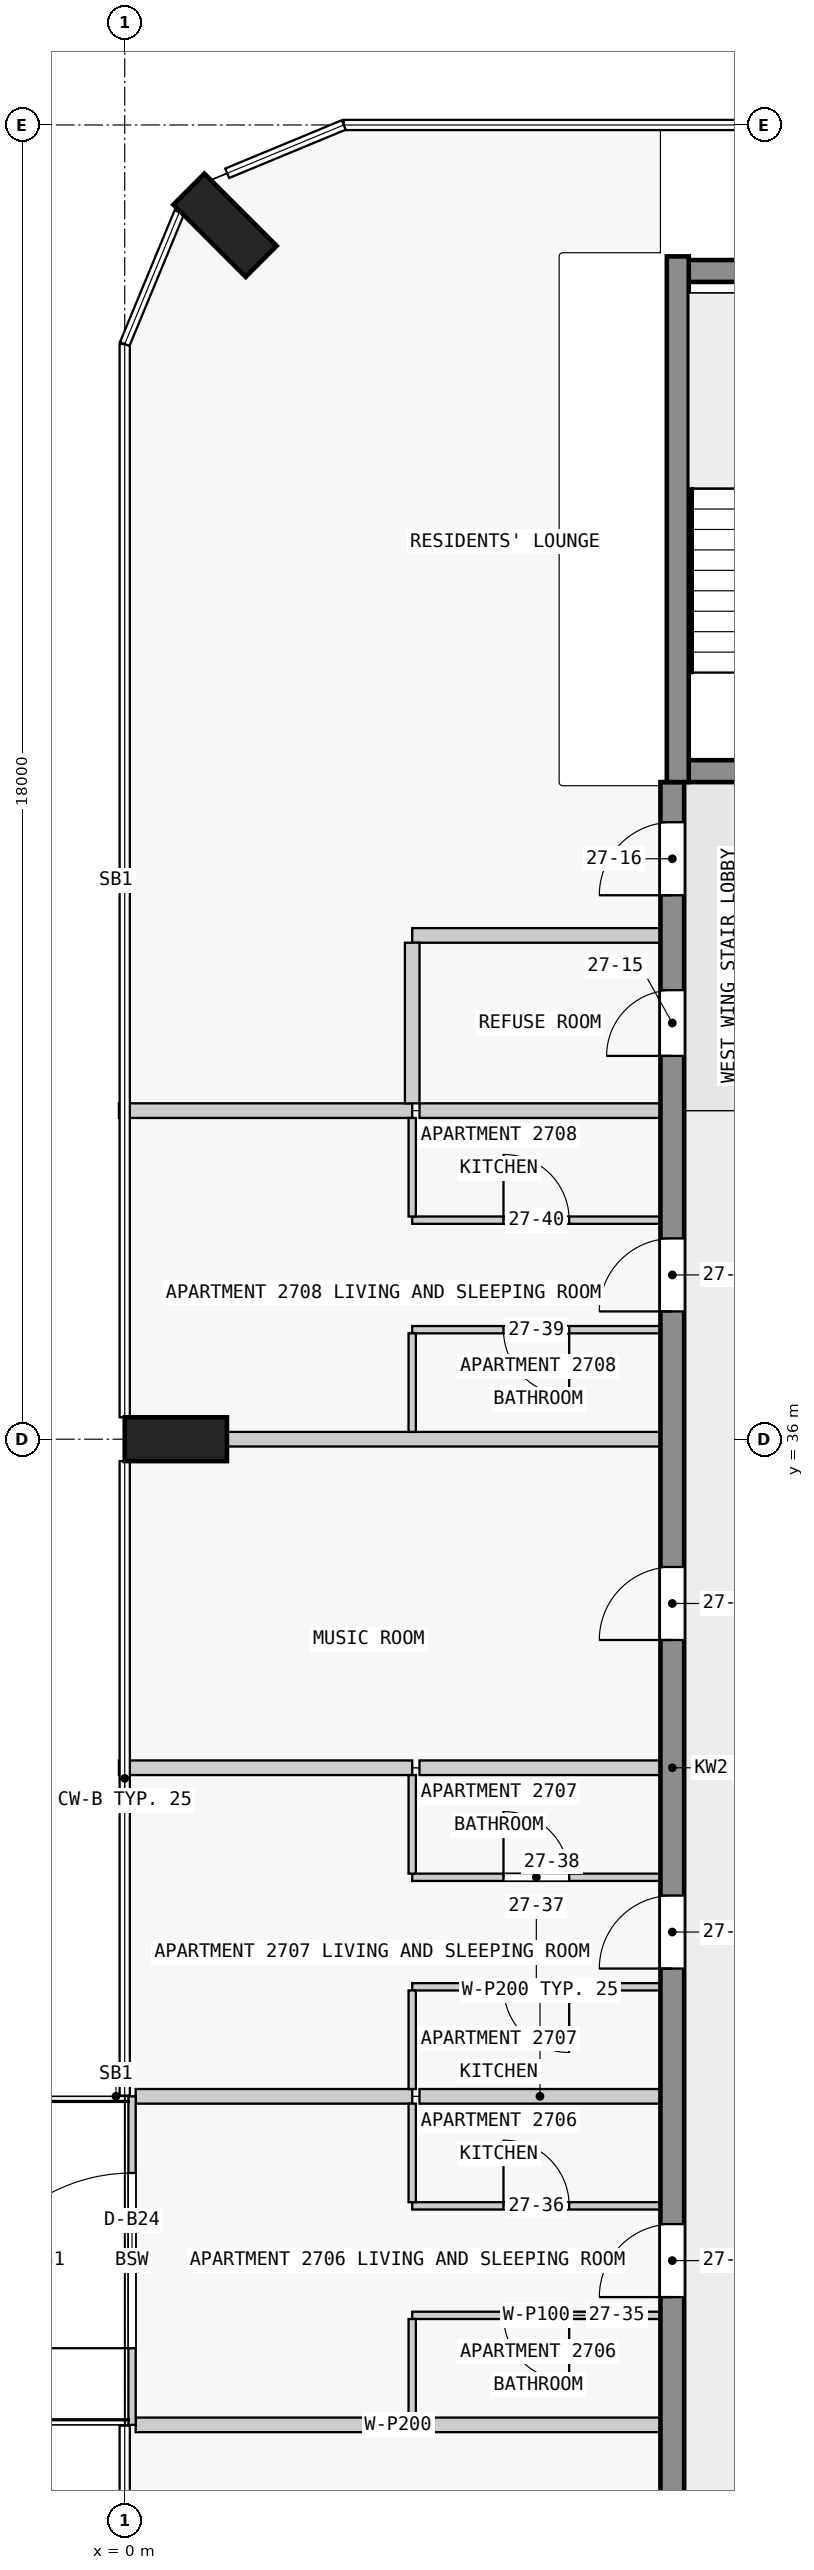
"""IFC4 building model, lengths in metres.
Left out: names, types, materials, properties, quantities, classifications, styles, units other than length and angle.
Written with IfcOpenShell. Run it as: python <this file> out.ifc"""

import sys

from ifc_helpers import new_model, si_unit, direction, frame, frame_2d, origin, origin_2d, place, context, subcontext, project, spatial, rectangle, extrude, element, fill, save


model = new_model("IFC4")
c1 = context("Model", 3, precision=1e-05, world=origin(), true_north=direction((0.0, 1.0)))
c2 = subcontext(c1, "Body", "Model", "MODEL_VIEW")
j1 = project(units=[si_unit("LENGTHUNIT", "METRE"), si_unit("PLANEANGLEUNIT", "RADIAN")], contexts=[c1])
p1 = place(None, origin())
s1 = spatial("IfcSite", under=j1, at=p1, CompositionType="ELEMENT")
p2 = place(p1, origin())
s2 = spatial("IfcBuilding", under=s1, at=p2, CompositionType="ELEMENT")
p3 = place(p2, frame((0.0, 0.0, 106.3)))
s3 = spatial("IfcBuildingStorey", under=s2, at=p3, CompositionType="ELEMENT", Elevation=106.3)
for number, where, z_axis, x_axis in (
    (1, (1.374, 52.626, 0.0), (0.0, 0.0, 1.0), (0.707, 0.707, 0.0)),
    (2, (0.7, 36.0, 0.0), (0.0, 0.0, 1.0), (0.0, 1.0, 0.0)),
):
    element("IfcColumn", number, at=place(p3, frame(where, z_axis=z_axis, x_axis=x_axis)), inside=s3, PredefinedType="COLUMN", context=c2, shape_type="SweptSolid", body=[
        extrude(rectangle(XDim=0.6, YDim=1.4, at=origin_2d()), origin(), (0.0, 0.0, 1.0), 3.5),
    ])
p4 = place(p3, frame((7.725, 45.15, 0.0), z_axis=(0.0, 0.0, 1.0), x_axis=(1.0, 0.0, 0.0)))
e3 = element("IfcWall", 3, at=p4, inside=s3, PredefinedType="SHEAR", context=c2, shape_type="SweptSolid", body=[
    extrude(rectangle(XDim=2.55, YDim=0.3, at=frame_2d((1.275, 0.0))), origin(), (0.0, 0.0, 1.0), 3.5),
])
p5 = place(p4, frame((0.725, 0.0, 0.0)))
e4 = element("IfcOpeningElement", 4, at=p5, cuts=e3, PredefinedType="OPENING", context=c2, shape_type="SweptSolid", body=[
    extrude(rectangle(XDim=1.1, YDim=2.1, at=frame_2d((0.55, 1.05))), frame((0.0, 0.16, 0.0), z_axis=(0.0, -1.0, 0.0), x_axis=(1.0, 0.0, 0.0)), (0.0, 0.0, 1.0), 0.32),
])
p6 = place(p3, frame((7.725, 52.0, 0.0), z_axis=(0.0, 0.0, 1.0), x_axis=(1.0, 0.0, 0.0)))
e5 = element("IfcWall", 5, at=p6, inside=s3, PredefinedType="SHEAR", context=c2, shape_type="SweptSolid", body=[
    extrude(rectangle(XDim=2.55, YDim=0.3, at=frame_2d((1.275, 0.0))), origin(), (0.0, 0.0, 1.0), 3.5),
])
p7 = place(p3, frame((7.575, 45.0, 0.0), z_axis=(0.0, 0.0, 1.0), x_axis=(0.0, 1.0, 0.0)))
e6 = element("IfcWall", 6, at=p7, inside=s3, PredefinedType="SHEAR", context=c2, shape_type="SweptSolid", body=[
    extrude(rectangle(XDim=7.2, YDim=0.3, at=frame_2d((3.6, 0.0))), origin(), (0.0, 0.0, 1.0), 3.5),
])
p8 = place(p3, frame((7.5, 18.0, 0.0), z_axis=(0.0, 0.0, 1.0), x_axis=(0.0, 1.0, 0.0)))
e7 = element("IfcWall", 7, at=p8, inside=s3, PredefinedType="SHEAR", context=c2, shape_type="SweptSolid", body=[
    extrude(rectangle(XDim=27.0, YDim=0.325, at=frame_2d((13.5, 0.0))), origin(), (0.0, 0.0, 1.0), 3.25),
])
p9 = place(p8, frame((1.75, 0.0, 0.0)))
e8 = element("IfcOpeningElement", 8, at=p9, cuts=e7, PredefinedType="OPENING", context=c2, shape_type="SweptSolid", body=[
    extrude(rectangle(XDim=1.0, YDim=2.1, at=frame_2d((0.5, 1.05))), frame((0.0, 0.172, 0.0), z_axis=(0.0, -1.0, 0.0), x_axis=(1.0, 0.0, 0.0)), (0.0, 0.0, 1.0), 0.345),
])
p10 = place(p8, frame((6.25, 0.0, 0.0)))
e9 = element("IfcOpeningElement", 9, at=p10, cuts=e7, PredefinedType="OPENING", context=c2, shape_type="SweptSolid", body=[
    extrude(rectangle(XDim=1.0, YDim=2.1, at=frame_2d((0.5, 1.05))), frame((0.0, 0.172, 0.0), z_axis=(0.0, -1.0, 0.0), x_axis=(1.0, 0.0, 0.0)), (0.0, 0.0, 1.0), 0.345),
])
p11 = place(p8, frame((10.75, 0.0, 0.0)))
e10 = element("IfcOpeningElement", 10, at=p11, cuts=e7, PredefinedType="OPENING", context=c2, shape_type="SweptSolid", body=[
    extrude(rectangle(XDim=1.0, YDim=2.1, at=frame_2d((0.5, 1.05))), frame((0.0, 0.172, 0.0), z_axis=(0.0, -1.0, 0.0), x_axis=(1.0, 0.0, 0.0)), (0.0, 0.0, 1.0), 0.345),
])
p12 = place(p8, frame((15.25, 0.0, 0.0)))
e11 = element("IfcOpeningElement", 11, at=p12, cuts=e7, PredefinedType="OPENING", context=c2, shape_type="SweptSolid", body=[
    extrude(rectangle(XDim=1.0, YDim=2.1, at=frame_2d((0.5, 1.05))), frame((0.0, 0.172, 0.0), z_axis=(0.0, -1.0, 0.0), x_axis=(1.0, 0.0, 0.0)), (0.0, 0.0, 1.0), 0.345),
])
p13 = place(p8, frame((19.75, 0.0, 0.0)))
e12 = element("IfcOpeningElement", 12, at=p13, cuts=e7, PredefinedType="OPENING", context=c2, shape_type="SweptSolid", body=[
    extrude(rectangle(XDim=1.0, YDim=2.1, at=frame_2d((0.5, 1.05))), frame((0.0, 0.172, 0.0), z_axis=(0.0, -1.0, 0.0), x_axis=(1.0, 0.0, 0.0)), (0.0, 0.0, 1.0), 0.345),
])
p14 = place(p8, frame((23.25, 0.0, 0.0)))
e13 = element("IfcOpeningElement", 13, at=p14, cuts=e7, PredefinedType="OPENING", context=c2, shape_type="SweptSolid", body=[
    extrude(rectangle(XDim=0.9, YDim=2.1, at=frame_2d((0.45, 1.05))), frame((0.0, 0.172, 0.0), z_axis=(0.0, -1.0, 0.0), x_axis=(1.0, 0.0, 0.0)), (0.0, 0.0, 1.0), 0.345),
])
p15 = place(p8, frame((25.45, 0.0, 0.0)))
e14 = element("IfcOpeningElement", 14, at=p15, cuts=e7, PredefinedType="OPENING", context=c2, shape_type="SweptSolid", body=[
    extrude(rectangle(XDim=1.0, YDim=2.1, at=frame_2d((0.5, 1.05))), frame((0.0, 0.172, 0.0), z_axis=(0.0, -1.0, 0.0), x_axis=(1.0, 0.0, 0.0)), (0.0, 0.0, 1.0), 0.345),
])
p16 = place(p3, frame((0.1, 22.5, 0.0), z_axis=(0.0, 0.0, 1.0), x_axis=(0.0, 1.0, 0.0)))
e15 = element("IfcWall", 15, at=p16, inside=s3, PredefinedType="STANDARD", context=c2, shape_type="SweptSolid", body=[
    extrude(rectangle(XDim=4.5, YDim=0.1, at=frame_2d((2.25, 0.0))), origin(), (0.0, 0.0, 1.0), 3.25),
])
p17 = place(p16, frame((1.05, 0.0, 0.0)))
e16 = element("IfcOpeningElement", 16, at=p17, cuts=e15, PredefinedType="OPENING", context=c2, shape_type="SweptSolid", body=[
    extrude(rectangle(XDim=2.4, YDim=2.4, at=frame_2d((1.2, 1.2))), frame((0.0, 0.06, 0.0), z_axis=(0.0, -1.0, 0.0), x_axis=(1.0, 0.0, 0.0)), (0.0, 0.0, 1.0), 0.12),
])
p18 = place(p3, frame((7.337, 22.5, 0.0), z_axis=(0.0, 0.0, 1.0), x_axis=(-1.0, 0.0, 0.0)))
e17 = element("IfcWall", 17, at=p18, inside=s3, PredefinedType="PARTITIONING", context=c2, shape_type="SweptSolid", body=[
    extrude(rectangle(XDim=7.188, YDim=0.2, at=frame_2d((3.594, 0.0))), origin(), (0.0, 0.0, 1.0), 3.25),
])
p19 = place(p3, frame((7.337, 24.0, 0.0), z_axis=(0.0, 0.0, 1.0), x_axis=(-1.0, 0.0, 0.0)))
e18 = element("IfcWall", 18, at=p19, inside=s3, PredefinedType="PARTITIONING", context=c2, shape_type="SweptSolid", body=[
    extrude(rectangle(XDim=3.4, YDim=0.1, at=frame_2d((1.7, 0.0))), origin(), (0.0, 0.0, 1.0), 3.25),
])
p20 = place(p19, frame((1.25, 0.0, 0.0)))
e19 = element("IfcOpeningElement", 19, at=p20, cuts=e18, PredefinedType="OPENING", context=c2, shape_type="SweptSolid", body=[
    extrude(rectangle(XDim=0.9, YDim=2.1, at=frame_2d((0.45, 1.05))), frame((0.0, 0.06, 0.0), z_axis=(0.0, -1.0, 0.0), x_axis=(1.0, 0.0, 0.0)), (0.0, 0.0, 1.0), 0.12),
])
p21 = place(p3, frame((3.938, 25.5, 0.0), z_axis=(0.0, 0.0, 1.0), x_axis=(1.0, 0.0, 0.0)))
e20 = element("IfcWall", 20, at=p21, inside=s3, PredefinedType="PARTITIONING", context=c2, shape_type="SweptSolid", body=[
    extrude(rectangle(XDim=3.4, YDim=0.1, at=frame_2d((1.7, 0.0))), origin(), (0.0, 0.0, 1.0), 3.25),
])
p22 = place(p21, frame((1.25, 0.0, 0.0)))
e21 = element("IfcOpeningElement", 21, at=p22, cuts=e20, PredefinedType="OPENING", context=c2, shape_type="SweptSolid", body=[
    extrude(rectangle(XDim=0.9, YDim=2.1, at=frame_2d((0.45, 1.05))), frame((0.0, 0.06, 0.0), z_axis=(0.0, -1.0, 0.0), x_axis=(1.0, 0.0, 0.0)), (0.0, 0.0, 1.0), 0.12),
])
p23 = place(p3, frame((7.337, 27.0, 0.0), z_axis=(0.0, 0.0, 1.0), x_axis=(-1.0, 0.0, 0.0)))
e22 = element("IfcWall", 22, at=p23, inside=s3, PredefinedType="PARTITIONING", context=c2, shape_type="SweptSolid", body=[
    extrude(rectangle(XDim=3.3, YDim=0.2, at=frame_2d((1.65, 0.0))), origin(), (0.0, 0.0, 1.0), 3.25),
])
p24 = place(p3, frame((0.15, 27.0, 0.0), z_axis=(0.0, 0.0, 1.0), x_axis=(1.0, 0.0, 0.0)))
e23 = element("IfcWall", 23, at=p24, inside=s3, PredefinedType="PARTITIONING", context=c2, shape_type="SweptSolid", body=[
    extrude(rectangle(XDim=3.788, YDim=0.2, at=frame_2d((1.894, 0.0))), origin(), (0.0, 0.0, 1.0), 3.25),
])
p25 = place(p3, frame((7.337, 28.5, 0.0), z_axis=(0.0, 0.0, 1.0), x_axis=(-1.0, 0.0, 0.0)))
e24 = element("IfcWall", 24, at=p25, inside=s3, PredefinedType="PARTITIONING", context=c2, shape_type="SweptSolid", body=[
    extrude(rectangle(XDim=3.4, YDim=0.1, at=frame_2d((1.7, 0.0))), origin(), (0.0, 0.0, 1.0), 3.25),
])
p26 = place(p25, frame((1.25, 0.0, 0.0)))
e25 = element("IfcOpeningElement", 25, at=p26, cuts=e24, PredefinedType="OPENING", context=c2, shape_type="SweptSolid", body=[
    extrude(rectangle(XDim=0.9, YDim=2.1, at=frame_2d((0.45, 1.05))), frame((0.0, 0.06, 0.0), z_axis=(0.0, -1.0, 0.0), x_axis=(1.0, 0.0, 0.0)), (0.0, 0.0, 1.0), 0.12),
])
p27 = place(p3, frame((3.938, 30.0, 0.0), z_axis=(0.0, 0.0, 1.0), x_axis=(1.0, 0.0, 0.0)))
e26 = element("IfcWall", 26, at=p27, inside=s3, PredefinedType="PARTITIONING", context=c2, shape_type="SweptSolid", body=[
    extrude(rectangle(XDim=3.4, YDim=0.1, at=frame_2d((1.7, 0.0))), origin(), (0.0, 0.0, 1.0), 3.25),
])
p28 = place(p27, frame((1.25, 0.0, 0.0)))
e27 = element("IfcOpeningElement", 27, at=p28, cuts=e26, PredefinedType="OPENING", context=c2, shape_type="SweptSolid", body=[
    extrude(rectangle(XDim=0.9, YDim=2.1, at=frame_2d((0.45, 1.05))), frame((0.0, 0.06, 0.0), z_axis=(0.0, -1.0, 0.0), x_axis=(1.0, 0.0, 0.0)), (0.0, 0.0, 1.0), 0.12),
])
p29 = place(p3, frame((7.337, 31.5, 0.0), z_axis=(0.0, 0.0, 1.0), x_axis=(-1.0, 0.0, 0.0)))
e28 = element("IfcWall", 28, at=p29, inside=s3, PredefinedType="PARTITIONING", context=c2, shape_type="SweptSolid", body=[
    extrude(rectangle(XDim=3.3, YDim=0.2, at=frame_2d((1.65, 0.0))), origin(), (0.0, 0.0, 1.0), 3.25),
])
p30 = place(p3, frame((-0.08, 31.5, 0.0), z_axis=(0.0, 0.0, 1.0), x_axis=(1.0, 0.0, 0.0)))
e29 = element("IfcWall", 29, at=p30, inside=s3, PredefinedType="PARTITIONING", context=c2, shape_type="SweptSolid", body=[
    extrude(rectangle(XDim=4.018, YDim=0.2, at=frame_2d((2.009, 0.0))), origin(), (0.0, 0.0, 1.0), 3.25),
])
p31 = place(p3, frame((7.337, 36.0, 0.0), z_axis=(0.0, 0.0, 1.0), x_axis=(-1.0, 0.0, 0.0)))
e30 = element("IfcWall", 30, at=p31, inside=s3, PredefinedType="PARTITIONING", context=c2, shape_type="SweptSolid", body=[
    extrude(rectangle(XDim=5.938, YDim=0.2, at=frame_2d((2.969, 0.0))), origin(), (0.0, 0.0, 1.0), 3.25),
])
p32 = place(p3, frame((7.337, 37.5, 0.0), z_axis=(0.0, 0.0, 1.0), x_axis=(-1.0, 0.0, 0.0)))
e31 = element("IfcWall", 31, at=p32, inside=s3, PredefinedType="PARTITIONING", context=c2, shape_type="SweptSolid", body=[
    extrude(rectangle(XDim=3.4, YDim=0.1, at=frame_2d((1.7, 0.0))), origin(), (0.0, 0.0, 1.0), 3.25),
])
p33 = place(p32, frame((1.25, 0.0, 0.0)))
e32 = element("IfcOpeningElement", 32, at=p33, cuts=e31, PredefinedType="OPENING", context=c2, shape_type="SweptSolid", body=[
    extrude(rectangle(XDim=0.9, YDim=2.1, at=frame_2d((0.45, 1.05))), frame((0.0, 0.06, 0.0), z_axis=(0.0, -1.0, 0.0), x_axis=(1.0, 0.0, 0.0)), (0.0, 0.0, 1.0), 0.12),
])
p34 = place(p3, frame((3.938, 39.0, 0.0), z_axis=(0.0, 0.0, 1.0), x_axis=(1.0, 0.0, 0.0)))
e33 = element("IfcWall", 33, at=p34, inside=s3, PredefinedType="PARTITIONING", context=c2, shape_type="SweptSolid", body=[
    extrude(rectangle(XDim=3.4, YDim=0.1, at=frame_2d((1.7, 0.0))), origin(), (0.0, 0.0, 1.0), 3.25),
])
p35 = place(p34, frame((1.25, 0.0, 0.0)))
e34 = element("IfcOpeningElement", 34, at=p35, cuts=e33, PredefinedType="OPENING", context=c2, shape_type="SweptSolid", body=[
    extrude(rectangle(XDim=0.9, YDim=2.1, at=frame_2d((0.45, 1.05))), frame((0.0, 0.06, 0.0), z_axis=(0.0, -1.0, 0.0), x_axis=(1.0, 0.0, 0.0)), (0.0, 0.0, 1.0), 0.12),
])
p36 = place(p3, frame((7.337, 40.5, 0.0), z_axis=(0.0, 0.0, 1.0), x_axis=(-1.0, 0.0, 0.0)))
e35 = element("IfcWall", 35, at=p36, inside=s3, PredefinedType="PARTITIONING", context=c2, shape_type="SweptSolid", body=[
    extrude(rectangle(XDim=3.3, YDim=0.2, at=frame_2d((1.65, 0.0))), origin(), (0.0, 0.0, 1.0), 3.25),
])
p37 = place(p3, frame((-0.08, 40.5, 0.0), z_axis=(0.0, 0.0, 1.0), x_axis=(1.0, 0.0, 0.0)))
e36 = element("IfcWall", 36, at=p37, inside=s3, PredefinedType="PARTITIONING", context=c2, shape_type="SweptSolid", body=[
    extrude(rectangle(XDim=4.018, YDim=0.2, at=frame_2d((2.009, 0.0))), origin(), (0.0, 0.0, 1.0), 3.25),
])
p38 = place(p3, frame((7.337, 42.9, 0.0), z_axis=(0.0, 0.0, 1.0), x_axis=(-1.0, 0.0, 0.0)))
e37 = element("IfcWall", 37, at=p38, inside=s3, PredefinedType="PARTITIONING", context=c2, shape_type="SweptSolid", body=[
    extrude(rectangle(XDim=3.4, YDim=0.2, at=frame_2d((1.7, 0.0))), origin(), (0.0, 0.0, 1.0), 3.25),
])
for number, where, z_axis, x_axis in (
    (38, (3.938, 23.95, 0.0), (0.0, 0.0, 1.0), (0.0, -1.0, 0.0)),
    (39, (3.938, 26.9, 0.0), (0.0, 0.0, 1.0), (0.0, -1.0, 0.0)),
    (40, (3.938, 28.45, 0.0), (0.0, 0.0, 1.0), (0.0, -1.0, 0.0)),
    (41, (3.938, 31.4, 0.0), (0.0, 0.0, 1.0), (0.0, -1.0, 0.0)),
    (42, (3.938, 37.45, 0.0), (0.0, 0.0, 1.0), (0.0, -1.0, 0.0)),
    (43, (3.938, 40.4, 0.0), (0.0, 0.0, 1.0), (0.0, -1.0, 0.0)),
):
    element("IfcWall", number, at=place(p3, frame(where, z_axis=z_axis, x_axis=x_axis)), inside=s3, PredefinedType="PARTITIONING", context=c2, shape_type="SweptSolid", body=[
        extrude(rectangle(XDim=1.35, YDim=0.1, at=frame_2d((0.675, 0.0))), origin(), (0.0, 0.0, 1.0), 3.25),
    ])
p39 = place(p3, frame((3.938, 42.8, 0.0), z_axis=(0.0, 0.0, 1.0), x_axis=(0.0, -1.0, 0.0)))
e44 = element("IfcWall", 44, at=p39, inside=s3, PredefinedType="PARTITIONING", context=c2, shape_type="SweptSolid", body=[
    extrude(rectangle(XDim=2.2, YDim=0.2, at=frame_2d((1.1, 0.0))), origin(), (0.0, 0.0, 1.0), 3.25),
])
p40 = place(p17, origin())
e45 = element("IfcDoor", 45, at=p40, inside=s3, OperationType="SINGLE_SWING_LEFT", PredefinedType="DOOR", context=c2, shape_type="SweptSolid", body=[
    extrude(rectangle(XDim=2.4, YDim=2.4, at=frame_2d((1.2, 1.2))), frame((0.0, 0.025, 0.0), z_axis=(0.0, -1.0, 0.0), x_axis=(1.0, 0.0, 0.0)), (0.0, 0.0, 1.0), 0.05),
])
fill(e16, e45)
p41 = place(p10, origin())
e46 = element("IfcDoor", 46, at=p41, inside=s3, OperationType="SINGLE_SWING_LEFT", PredefinedType="DOOR", context=c2, shape_type="SweptSolid", body=[
    extrude(rectangle(XDim=1.0, YDim=2.1, at=frame_2d((0.5, 1.05))), frame((0.0, 0.025, 0.0), z_axis=(0.0, -1.0, 0.0), x_axis=(1.0, 0.0, 0.0)), (0.0, 0.0, 1.0), 0.05),
])
fill(e9, e46)
p42 = place(p11, origin())
e47 = element("IfcDoor", 47, at=p42, inside=s3, OperationType="SINGLE_SWING_LEFT", PredefinedType="DOOR", context=c2, shape_type="SweptSolid", body=[
    extrude(rectangle(XDim=1.0, YDim=2.1, at=frame_2d((0.5, 1.05))), frame((0.0, 0.025, 0.0), z_axis=(0.0, -1.0, 0.0), x_axis=(1.0, 0.0, 0.0)), (0.0, 0.0, 1.0), 0.05),
])
fill(e10, e47)
p43 = place(p12, origin())
e48 = element("IfcDoor", 48, at=p43, inside=s3, OperationType="SINGLE_SWING_RIGHT", PredefinedType="DOOR", context=c2, shape_type="SweptSolid", body=[
    extrude(rectangle(XDim=1.0, YDim=2.1, at=frame_2d((0.5, 1.05))), frame((0.0, 0.025, 0.0), z_axis=(0.0, -1.0, 0.0), x_axis=(1.0, 0.0, 0.0)), (0.0, 0.0, 1.0), 0.05),
])
fill(e11, e48)
p44 = place(p13, origin())
e49 = element("IfcDoor", 49, at=p44, inside=s3, OperationType="SINGLE_SWING_RIGHT", PredefinedType="DOOR", context=c2, shape_type="SweptSolid", body=[
    extrude(rectangle(XDim=1.0, YDim=2.1, at=frame_2d((0.5, 1.05))), frame((0.0, 0.025, 0.0), z_axis=(0.0, -1.0, 0.0), x_axis=(1.0, 0.0, 0.0)), (0.0, 0.0, 1.0), 0.05),
])
fill(e12, e49)
p45 = place(p14, origin())
e50 = element("IfcDoor", 50, at=p45, inside=s3, OperationType="SINGLE_SWING_RIGHT", PredefinedType="DOOR", context=c2, shape_type="SweptSolid", body=[
    extrude(rectangle(XDim=0.9, YDim=2.1, at=frame_2d((0.45, 1.05))), frame((0.0, 0.025, 0.0), z_axis=(0.0, -1.0, 0.0), x_axis=(1.0, 0.0, 0.0)), (0.0, 0.0, 1.0), 0.05),
])
fill(e13, e50)
p46 = place(p15, origin())
e51 = element("IfcDoor", 51, at=p46, inside=s3, OperationType="SINGLE_SWING_RIGHT", PredefinedType="DOOR", context=c2, shape_type="SweptSolid", body=[
    extrude(rectangle(XDim=1.0, YDim=2.1, at=frame_2d((0.5, 1.05))), frame((0.0, 0.025, 0.0), z_axis=(0.0, -1.0, 0.0), x_axis=(1.0, 0.0, 0.0)), (0.0, 0.0, 1.0), 0.05),
])
fill(e14, e51)
p47 = place(p20, origin())
e52 = element("IfcDoor", 52, at=p47, inside=s3, OperationType="SINGLE_SWING_LEFT", PredefinedType="DOOR", context=c2, shape_type="SweptSolid", body=[
    extrude(rectangle(XDim=0.9, YDim=2.1, at=frame_2d((0.45, 1.05))), frame((0.0, 0.025, 0.0), z_axis=(0.0, -1.0, 0.0), x_axis=(1.0, 0.0, 0.0)), (0.0, 0.0, 1.0), 0.05),
])
fill(e19, e52)
p48 = place(p22, origin())
e53 = element("IfcDoor", 53, at=p48, inside=s3, OperationType="SINGLE_SWING_LEFT", PredefinedType="DOOR", context=c2, shape_type="SweptSolid", body=[
    extrude(rectangle(XDim=0.9, YDim=2.1, at=frame_2d((0.45, 1.05))), frame((0.0, 0.025, 0.0), z_axis=(0.0, -1.0, 0.0), x_axis=(1.0, 0.0, 0.0)), (0.0, 0.0, 1.0), 0.05),
])
fill(e21, e53)
p49 = place(p26, origin())
e54 = element("IfcDoor", 54, at=p49, inside=s3, OperationType="SINGLE_SWING_LEFT", PredefinedType="DOOR", context=c2, shape_type="SweptSolid", body=[
    extrude(rectangle(XDim=0.9, YDim=2.1, at=frame_2d((0.45, 1.05))), frame((0.0, 0.025, 0.0), z_axis=(0.0, -1.0, 0.0), x_axis=(1.0, 0.0, 0.0)), (0.0, 0.0, 1.0), 0.05),
])
fill(e25, e54)
p50 = place(p28, origin())
e55 = element("IfcDoor", 55, at=p50, inside=s3, OperationType="SINGLE_SWING_LEFT", PredefinedType="DOOR", context=c2, shape_type="SweptSolid", body=[
    extrude(rectangle(XDim=0.9, YDim=2.1, at=frame_2d((0.45, 1.05))), frame((0.0, 0.025, 0.0), z_axis=(0.0, -1.0, 0.0), x_axis=(1.0, 0.0, 0.0)), (0.0, 0.0, 1.0), 0.05),
])
fill(e27, e55)
p51 = place(p33, origin())
e56 = element("IfcDoor", 56, at=p51, inside=s3, OperationType="SINGLE_SWING_LEFT", PredefinedType="DOOR", context=c2, shape_type="SweptSolid", body=[
    extrude(rectangle(XDim=0.9, YDim=2.1, at=frame_2d((0.45, 1.05))), frame((0.0, 0.025, 0.0), z_axis=(0.0, -1.0, 0.0), x_axis=(1.0, 0.0, 0.0)), (0.0, 0.0, 1.0), 0.05),
])
fill(e32, e56)
p52 = place(p35, origin())
e57 = element("IfcDoor", 57, at=p52, inside=s3, OperationType="SINGLE_SWING_LEFT", PredefinedType="DOOR", context=c2, shape_type="SweptSolid", body=[
    extrude(rectangle(XDim=0.9, YDim=2.1, at=frame_2d((0.45, 1.05))), frame((0.0, 0.025, 0.0), z_axis=(0.0, -1.0, 0.0), x_axis=(1.0, 0.0, 0.0)), (0.0, 0.0, 1.0), 0.05),
])
fill(e34, e57)
save(model, sys.argv[1])
